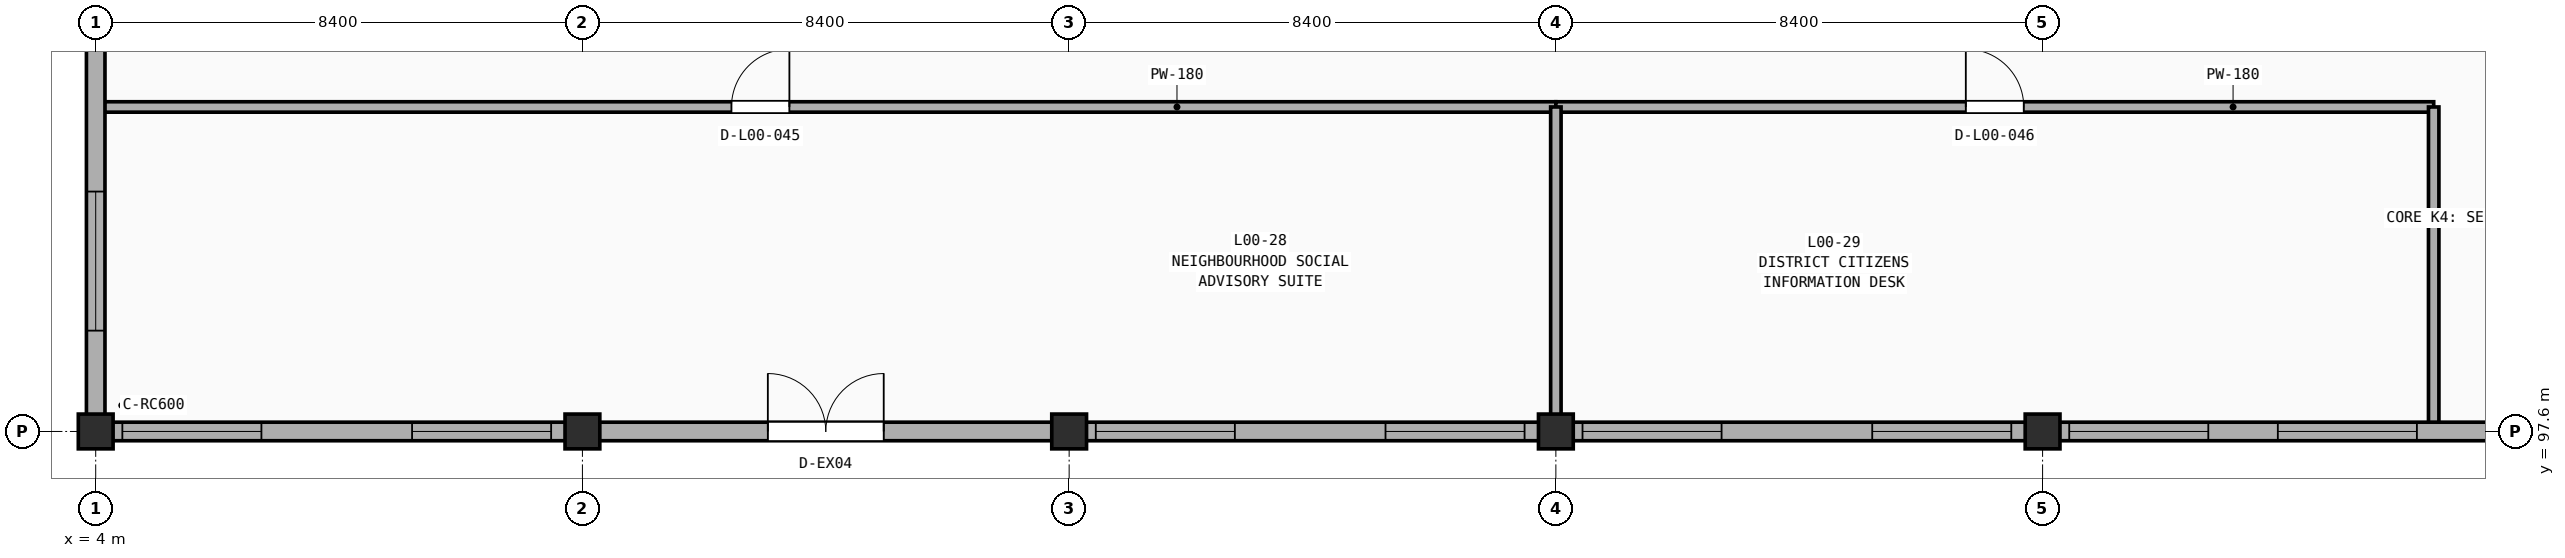
"""IFC4 building model, lengths in metres.
Left out: names, types, materials, properties, quantities, classifications, styles, units other than length and angle.
Written with IfcOpenShell. Run it as: python <this file> out.ifc"""

import sys

from ifc_helpers import new_model, si_unit, direction, frame, frame_2d, origin, origin_2d, place, context, subcontext, project, spatial, rectangle, extrude, element, fill, save


model = new_model("IFC4")
c1 = context("Model", 3, precision=1e-05, world=origin(), true_north=direction((0.0, 1.0)))
c2 = subcontext(c1, "Body", "Model", "MODEL_VIEW")
j1 = project(units=[si_unit("LENGTHUNIT", "METRE"), si_unit("PLANEANGLEUNIT", "RADIAN")], contexts=[c1])
p1 = place(None, origin())
s1 = spatial("IfcSite", under=j1, at=p1, CompositionType="ELEMENT")
p2 = place(p1, origin())
s2 = spatial("IfcBuilding", under=s1, at=p2, CompositionType="ELEMENT")
p3 = place(p2, origin())
s3 = spatial("IfcBuildingStorey", under=s2, at=p3, CompositionType="ELEMENT", Elevation=0.0)
for number, where, z_axis, x_axis in (
    (1, (4.0, 97.6, 0.0), (0.0, 0.0, 1.0), (1.0, 0.0, 0.0)),
    (2, (12.4, 97.6, 0.0), (0.0, 0.0, 1.0), (1.0, 0.0, 0.0)),
    (3, (20.8, 97.6, 0.0), (0.0, 0.0, 1.0), (1.0, 0.0, 0.0)),
    (4, (29.2, 97.6, 0.0), (0.0, 0.0, 1.0), (1.0, 0.0, 0.0)),
    (5, (37.6, 97.6, 0.0), (0.0, 0.0, 1.0), (1.0, 0.0, 0.0)),
):
    element("IfcColumn", number, at=place(p3, frame(where, z_axis=z_axis, x_axis=x_axis)), inside=s3, PredefinedType="COLUMN", context=c2, shape_type="SweptSolid", body=[
        extrude(rectangle(XDim=0.6, YDim=0.6, at=origin_2d()), origin(), (0.0, 0.0, 1.0), 5.4),
    ])
p4 = place(p3, frame((4.15, 103.2, 0.0), z_axis=(0.0, 0.0, 1.0), x_axis=(1.0, 0.0, 0.0)))
e6 = element("IfcWall", 6, at=p4, inside=s3, PredefinedType="PARTITIONING", context=c2, shape_type="SweptSolid", body=[
    extrude(rectangle(XDim=25.05, YDim=0.18, at=frame_2d((12.525, 0.0))), origin(), (0.0, 0.0, 1.0), 4.64),
])
p5 = place(p4, frame((10.822, 0.0, -0.01)))
e7 = element("IfcOpeningElement", 7, at=p5, cuts=e6, PredefinedType="OPENING", context=c2, shape_type="SweptSolid", body=[
    extrude(rectangle(XDim=1.0, YDim=2.16, at=frame_2d((0.5, 1.08))), frame((0.0, 0.1, 0.0), z_axis=(0.0, -1.0, 0.0), x_axis=(1.0, 0.0, 0.0)), (0.0, 0.0, 1.0), 0.2),
])
p6 = place(p3, frame((29.2, 103.2, 0.0), z_axis=(0.0, 0.0, 1.0), x_axis=(1.0, 0.0, 0.0)))
e8 = element("IfcWall", 8, at=p6, inside=s3, PredefinedType="PARTITIONING", context=c2, shape_type="SweptSolid", body=[
    extrude(rectangle(XDim=15.15, YDim=0.18, at=frame_2d((7.575, 0.0))), origin(), (0.0, 0.0, 1.0), 4.64),
])
p7 = place(p6, frame((7.075, 0.0, -0.01)))
e9 = element("IfcOpeningElement", 9, at=p7, cuts=e8, PredefinedType="OPENING", context=c2, shape_type="SweptSolid", body=[
    extrude(rectangle(XDim=1.0, YDim=2.16, at=frame_2d((0.5, 1.08))), frame((0.0, 0.1, 0.0), z_axis=(0.0, -1.0, 0.0), x_axis=(1.0, 0.0, 0.0)), (0.0, 0.0, 1.0), 0.2),
])
for number, where, z_axis, x_axis in (
    (10, (29.2, 97.75, 0.0), (0.0, 0.0, 1.0), (0.0, 1.0, 0.0)),
    (11, (44.35, 97.75, 0.0), (0.0, 0.0, 1.0), (0.0, 1.0, 0.0)),
):
    element("IfcWall", number, at=place(p3, frame(where, z_axis=z_axis, x_axis=x_axis)), inside=s3, PredefinedType="PARTITIONING", context=c2, shape_type="SweptSolid", body=[
        extrude(rectangle(XDim=5.45, YDim=0.18, at=frame_2d((2.725, 0.0))), origin(), (0.0, 0.0, 1.0), 4.64),
    ])
p8 = place(p3, frame((4.0, 97.6, 0.0), z_axis=(0.0, 0.0, 1.0), x_axis=(1.0, 0.0, 0.0)))
e12 = element("IfcWall", 12, at=p8, inside=s3, PredefinedType="SOLIDWALL", context=c2, shape_type="SweptSolid", body=[
    extrude(rectangle(XDim=8.4, YDim=0.32, at=frame_2d((4.2, 0.0))), origin(), (0.0, 0.0, 1.0), 4.64),
])
p9 = place(p8, frame((0.46, 0.0, 0.9)))
e13 = element("IfcOpeningElement", 13, at=p9, cuts=e12, PredefinedType="OPENING", context=c2, shape_type="SweptSolid", body=[
    extrude(rectangle(XDim=2.4, YDim=2.35, at=frame_2d((1.2, 1.175))), frame((0.0, 0.17, 0.0), z_axis=(0.0, -1.0, 0.0), x_axis=(1.0, 0.0, 0.0)), (0.0, 0.0, 1.0), 0.34),
])
p10 = place(p8, frame((5.46, 0.0, 0.9)))
e14 = element("IfcOpeningElement", 14, at=p10, cuts=e12, PredefinedType="OPENING", context=c2, shape_type="SweptSolid", body=[
    extrude(rectangle(XDim=2.4, YDim=2.35, at=frame_2d((1.2, 1.175))), frame((0.0, 0.17, 0.0), z_axis=(0.0, -1.0, 0.0), x_axis=(1.0, 0.0, 0.0)), (0.0, 0.0, 1.0), 0.34),
])
p11 = place(p3, frame((12.4, 97.6, 0.0), z_axis=(0.0, 0.0, 1.0), x_axis=(1.0, 0.0, 0.0)))
e15 = element("IfcWall", 15, at=p11, inside=s3, PredefinedType="SOLIDWALL", context=c2, shape_type="SweptSolid", body=[
    extrude(rectangle(XDim=8.4, YDim=0.32, at=frame_2d((4.2, 0.0))), origin(), (0.0, 0.0, 1.0), 4.64),
])
p12 = place(p11, frame((3.2, 0.0, -0.01)))
e16 = element("IfcOpeningElement", 16, at=p12, cuts=e15, PredefinedType="OPENING", context=c2, shape_type="SweptSolid", body=[
    extrude(rectangle(XDim=2.0, YDim=2.41, at=frame_2d((1.0, 1.205))), frame((0.0, 0.17, 0.0), z_axis=(0.0, -1.0, 0.0), x_axis=(1.0, 0.0, 0.0)), (0.0, 0.0, 1.0), 0.34),
])
p13 = place(p3, frame((20.8, 97.6, 0.0), z_axis=(0.0, 0.0, 1.0), x_axis=(1.0, 0.0, 0.0)))
e17 = element("IfcWall", 17, at=p13, inside=s3, PredefinedType="SOLIDWALL", context=c2, shape_type="SweptSolid", body=[
    extrude(rectangle(XDim=8.4, YDim=0.32, at=frame_2d((4.2, 0.0))), origin(), (0.0, 0.0, 1.0), 4.64),
])
p14 = place(p13, frame((0.46, 0.0, 0.9)))
e18 = element("IfcOpeningElement", 18, at=p14, cuts=e17, PredefinedType="OPENING", context=c2, shape_type="SweptSolid", body=[
    extrude(rectangle(XDim=2.4, YDim=2.35, at=frame_2d((1.2, 1.175))), frame((0.0, 0.17, 0.0), z_axis=(0.0, -1.0, 0.0), x_axis=(1.0, 0.0, 0.0)), (0.0, 0.0, 1.0), 0.34),
])
p15 = place(p13, frame((5.46, 0.0, 0.9)))
e19 = element("IfcOpeningElement", 19, at=p15, cuts=e17, PredefinedType="OPENING", context=c2, shape_type="SweptSolid", body=[
    extrude(rectangle(XDim=2.4, YDim=2.35, at=frame_2d((1.2, 1.175))), frame((0.0, 0.17, 0.0), z_axis=(0.0, -1.0, 0.0), x_axis=(1.0, 0.0, 0.0)), (0.0, 0.0, 1.0), 0.34),
])
p16 = place(p3, frame((29.2, 97.6, 0.0), z_axis=(0.0, 0.0, 1.0), x_axis=(1.0, 0.0, 0.0)))
e20 = element("IfcWall", 20, at=p16, inside=s3, PredefinedType="SOLIDWALL", context=c2, shape_type="SweptSolid", body=[
    extrude(rectangle(XDim=8.4, YDim=0.32, at=frame_2d((4.2, 0.0))), origin(), (0.0, 0.0, 1.0), 4.64),
])
p17 = place(p16, frame((0.46, 0.0, 0.9)))
e21 = element("IfcOpeningElement", 21, at=p17, cuts=e20, PredefinedType="OPENING", context=c2, shape_type="SweptSolid", body=[
    extrude(rectangle(XDim=2.4, YDim=2.35, at=frame_2d((1.2, 1.175))), frame((0.0, 0.17, 0.0), z_axis=(0.0, -1.0, 0.0), x_axis=(1.0, 0.0, 0.0)), (0.0, 0.0, 1.0), 0.34),
])
p18 = place(p16, frame((5.46, 0.0, 0.9)))
e22 = element("IfcOpeningElement", 22, at=p18, cuts=e20, PredefinedType="OPENING", context=c2, shape_type="SweptSolid", body=[
    extrude(rectangle(XDim=2.4, YDim=2.35, at=frame_2d((1.2, 1.175))), frame((0.0, 0.17, 0.0), z_axis=(0.0, -1.0, 0.0), x_axis=(1.0, 0.0, 0.0)), (0.0, 0.0, 1.0), 0.34),
])
p19 = place(p3, frame((37.6, 97.6, 0.0), z_axis=(0.0, 0.0, 1.0), x_axis=(1.0, 0.0, 0.0)))
e23 = element("IfcWall", 23, at=p19, inside=s3, PredefinedType="SOLIDWALL", context=c2, shape_type="SweptSolid", body=[
    extrude(rectangle(XDim=8.4, YDim=0.32, at=frame_2d((4.2, 0.0))), origin(), (0.0, 0.0, 1.0), 4.64),
])
p20 = place(p19, frame((0.46, 0.0, 0.9)))
e24 = element("IfcOpeningElement", 24, at=p20, cuts=e23, PredefinedType="OPENING", context=c2, shape_type="SweptSolid", body=[
    extrude(rectangle(XDim=2.4, YDim=2.35, at=frame_2d((1.2, 1.175))), frame((0.0, 0.17, 0.0), z_axis=(0.0, -1.0, 0.0), x_axis=(1.0, 0.0, 0.0)), (0.0, 0.0, 1.0), 0.34),
])
p21 = place(p19, frame((4.06, 0.0, 0.9)))
e25 = element("IfcOpeningElement", 25, at=p21, cuts=e23, PredefinedType="OPENING", context=c2, shape_type="SweptSolid", body=[
    extrude(rectangle(XDim=2.4, YDim=2.35, at=frame_2d((1.2, 1.175))), frame((0.0, 0.17, 0.0), z_axis=(0.0, -1.0, 0.0), x_axis=(1.0, 0.0, 0.0)), (0.0, 0.0, 1.0), 0.34),
])
p22 = place(p3, frame((4.0, 106.0, 0.0), z_axis=(0.0, 0.0, 1.0), x_axis=(0.0, -1.0, 0.0)))
e26 = element("IfcWall", 26, at=p22, inside=s3, PredefinedType="SOLIDWALL", context=c2, shape_type="SweptSolid", body=[
    extrude(rectangle(XDim=8.4, YDim=0.32, at=frame_2d((4.2, 0.0))), origin(), (0.0, 0.0, 1.0), 4.54),
])
p23 = place(p22, frame((4.26, 0.0, 0.9)))
e27 = element("IfcOpeningElement", 27, at=p23, cuts=e26, PredefinedType="OPENING", context=c2, shape_type="SweptSolid", body=[
    extrude(rectangle(XDim=2.4, YDim=2.35, at=frame_2d((1.2, 1.175))), frame((0.0, 0.17, 0.0), z_axis=(0.0, -1.0, 0.0), x_axis=(1.0, 0.0, 0.0)), (0.0, 0.0, 1.0), 0.34),
])
p24 = place(p5, frame((1.0, 0.0, 0.01), z_axis=(0.0, 0.0, 1.0), x_axis=(-1.0, 0.0, 0.0)))
e28 = element("IfcDoor", 28, at=p24, inside=s3, OperationType="SINGLE_SWING_RIGHT", PredefinedType="DOOR", context=c2, shape_type="SweptSolid", body=[
    extrude(rectangle(XDim=1.0, YDim=2.15, at=frame_2d((0.5, 1.075))), frame((0.0, 0.025, 0.0), z_axis=(0.0, -1.0, 0.0), x_axis=(1.0, 0.0, 0.0)), (0.0, 0.0, 1.0), 0.05),
])
fill(e7, e28)
p25 = place(p7, frame((0.0, 0.0, 0.01)))
e29 = element("IfcDoor", 29, at=p25, inside=s3, OperationType="SINGLE_SWING_LEFT", PredefinedType="DOOR", context=c2, shape_type="SweptSolid", body=[
    extrude(rectangle(XDim=1.0, YDim=2.15, at=frame_2d((0.5, 1.075))), frame((0.0, 0.025, 0.0), z_axis=(0.0, -1.0, 0.0), x_axis=(1.0, 0.0, 0.0)), (0.0, 0.0, 1.0), 0.05),
])
fill(e9, e29)
p26 = place(p9, origin())
e30 = element("IfcWindow", 30, at=p26, inside=s3, PartitioningType="TRIPLE_PANEL_VERTICAL", PredefinedType="WINDOW", context=c2, shape_type="SweptSolid", body=[
    extrude(rectangle(XDim=2.4, YDim=2.35, at=frame_2d((1.2, 1.175))), frame((0.0, 0.03, 0.0), z_axis=(0.0, -1.0, 0.0), x_axis=(1.0, 0.0, 0.0)), (0.0, 0.0, 1.0), 0.06),
])
fill(e13, e30)
p27 = place(p10, origin())
e31 = element("IfcWindow", 31, at=p27, inside=s3, PartitioningType="TRIPLE_PANEL_VERTICAL", PredefinedType="WINDOW", context=c2, shape_type="SweptSolid", body=[
    extrude(rectangle(XDim=2.4, YDim=2.35, at=frame_2d((1.2, 1.175))), frame((0.0, 0.03, 0.0), z_axis=(0.0, -1.0, 0.0), x_axis=(1.0, 0.0, 0.0)), (0.0, 0.0, 1.0), 0.06),
])
fill(e14, e31)
p28 = place(p12, frame((0.0, 0.0, 0.01)))
e32 = element("IfcDoor", 32, at=p28, inside=s3, OperationType="DOUBLE_SWING_LEFT", PredefinedType="DOOR", context=c2, shape_type="SweptSolid", body=[
    extrude(rectangle(XDim=2.0, YDim=2.4, at=frame_2d((1.0, 1.2))), frame((0.0, 0.025, 0.0), z_axis=(0.0, -1.0, 0.0), x_axis=(1.0, 0.0, 0.0)), (0.0, 0.0, 1.0), 0.05),
])
fill(e16, e32)
p29 = place(p14, origin())
e33 = element("IfcWindow", 33, at=p29, inside=s3, PartitioningType="TRIPLE_PANEL_VERTICAL", PredefinedType="WINDOW", context=c2, shape_type="SweptSolid", body=[
    extrude(rectangle(XDim=2.4, YDim=2.35, at=frame_2d((1.2, 1.175))), frame((0.0, 0.03, 0.0), z_axis=(0.0, -1.0, 0.0), x_axis=(1.0, 0.0, 0.0)), (0.0, 0.0, 1.0), 0.06),
])
fill(e18, e33)
p30 = place(p15, origin())
e34 = element("IfcWindow", 34, at=p30, inside=s3, PartitioningType="TRIPLE_PANEL_VERTICAL", PredefinedType="WINDOW", context=c2, shape_type="SweptSolid", body=[
    extrude(rectangle(XDim=2.4, YDim=2.35, at=frame_2d((1.2, 1.175))), frame((0.0, 0.03, 0.0), z_axis=(0.0, -1.0, 0.0), x_axis=(1.0, 0.0, 0.0)), (0.0, 0.0, 1.0), 0.06),
])
fill(e19, e34)
p31 = place(p17, origin())
e35 = element("IfcWindow", 35, at=p31, inside=s3, PartitioningType="TRIPLE_PANEL_VERTICAL", PredefinedType="WINDOW", context=c2, shape_type="SweptSolid", body=[
    extrude(rectangle(XDim=2.4, YDim=2.35, at=frame_2d((1.2, 1.175))), frame((0.0, 0.03, 0.0), z_axis=(0.0, -1.0, 0.0), x_axis=(1.0, 0.0, 0.0)), (0.0, 0.0, 1.0), 0.06),
])
fill(e21, e35)
p32 = place(p18, origin())
e36 = element("IfcWindow", 36, at=p32, inside=s3, PartitioningType="TRIPLE_PANEL_VERTICAL", PredefinedType="WINDOW", context=c2, shape_type="SweptSolid", body=[
    extrude(rectangle(XDim=2.4, YDim=2.35, at=frame_2d((1.2, 1.175))), frame((0.0, 0.03, 0.0), z_axis=(0.0, -1.0, 0.0), x_axis=(1.0, 0.0, 0.0)), (0.0, 0.0, 1.0), 0.06),
])
fill(e22, e36)
p33 = place(p20, origin())
e37 = element("IfcWindow", 37, at=p33, inside=s3, PartitioningType="TRIPLE_PANEL_VERTICAL", PredefinedType="WINDOW", context=c2, shape_type="SweptSolid", body=[
    extrude(rectangle(XDim=2.4, YDim=2.35, at=frame_2d((1.2, 1.175))), frame((0.0, 0.03, 0.0), z_axis=(0.0, -1.0, 0.0), x_axis=(1.0, 0.0, 0.0)), (0.0, 0.0, 1.0), 0.06),
])
fill(e24, e37)
p34 = place(p21, origin())
e38 = element("IfcWindow", 38, at=p34, inside=s3, PartitioningType="TRIPLE_PANEL_VERTICAL", PredefinedType="WINDOW", context=c2, shape_type="SweptSolid", body=[
    extrude(rectangle(XDim=2.4, YDim=2.35, at=frame_2d((1.2, 1.175))), frame((0.0, 0.03, 0.0), z_axis=(0.0, -1.0, 0.0), x_axis=(1.0, 0.0, 0.0)), (0.0, 0.0, 1.0), 0.06),
])
fill(e25, e38)
p35 = place(p23, origin())
e39 = element("IfcWindow", 39, at=p35, inside=s3, PartitioningType="TRIPLE_PANEL_VERTICAL", PredefinedType="WINDOW", context=c2, shape_type="SweptSolid", body=[
    extrude(rectangle(XDim=2.4, YDim=2.35, at=frame_2d((1.2, 1.175))), frame((0.0, 0.03, 0.0), z_axis=(0.0, -1.0, 0.0), x_axis=(1.0, 0.0, 0.0)), (0.0, 0.0, 1.0), 0.06),
])
fill(e27, e39)
save(model, sys.argv[1])
